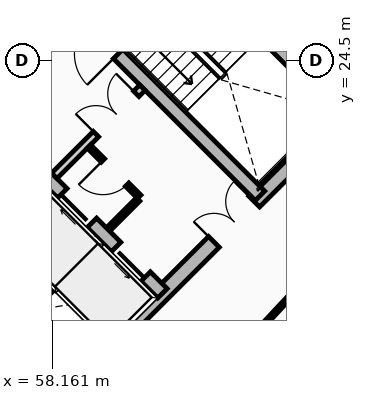
"""IFC4 building model, lengths in metres.
Left out: names, types, materials, properties, quantities, classifications, styles, units other than length and angle.
Written with IfcOpenShell. Run it as: python <this file> out.ifc"""

import sys

from ifc_helpers import new_model, si_unit, direction, frame, frame_2d, origin, place, context, subcontext, project, spatial, rectangle, extrude, source, transform, mapped, element, fill, save


model = new_model("IFC4")
c1 = context("Model", 3, precision=1e-05, world=origin(), true_north=direction((0.0, 1.0)))
c2 = subcontext(c1, "Body", "Model", "MODEL_VIEW")
j1 = project(units=[si_unit("LENGTHUNIT", "METRE"), si_unit("PLANEANGLEUNIT", "RADIAN")], contexts=[c1])
p1 = place(None, origin())
s1 = spatial("IfcSite", under=j1, at=p1, CompositionType="ELEMENT")
p2 = place(p1, origin())
s2 = spatial("IfcBuilding", under=s1, at=p2, CompositionType="ELEMENT")
p3 = place(p2, frame((0.0, 0.0, 189.43)))
s3 = spatial("IfcBuildingStorey", under=s2, at=p3, CompositionType="ELEMENT", Elevation=189.43)
for number, where, z_axis, x_axis in (
    (1, (58.702, 15.732, 0.0), (0.0, 0.0, 1.0), (-0.707, 0.707, 0.0)),
    (2, (66.268, 23.298, 0.0), (0.0, 0.0, 1.0), (-0.707, 0.707, 0.0)),
):
    element("IfcWall", number, at=place(p3, frame(where, z_axis=z_axis, x_axis=x_axis)), inside=s3, PredefinedType="SHEAR", context=c2, shape_type="SweptSolid", body=[
        extrude(rectangle(XDim=14.1, YDim=0.4, at=frame_2d((7.05, 0.0))), origin(), (0.0, 0.0, 1.0), 2.91),
    ])
p4 = place(p3, frame((58.561, 15.873, 0.0), z_axis=(0.0, 0.0, 1.0), x_axis=(0.707106781187, 0.707106781187, 0.0)))
e3 = element("IfcWall", 3, at=p4, inside=s3, PredefinedType="SHEAR", context=c2, shape_type="SweptSolid", body=[
    extrude(rectangle(XDim=10.7, YDim=0.4, at=frame_2d((5.35, 0.0))), origin(), (0.0, 0.0, 1.0), 2.91),
])
m1 = source(origin(), c2, "Body", "SweptSolid", [
    extrude(rectangle(XDim=1.5, YDim=2.02, at=frame_2d((0.75, 1.01))), frame((0.0, 0.21, 0.0), z_axis=(0.0, -1.0, 0.0), x_axis=(1.0, 0.0, 0.0)), (0.0, 0.0, 1.0), 0.42),
])
p5 = place(p4, frame((5.45, 0.0, 0.0)))
e4 = element("IfcOpeningElement", 4, at=p5, cuts=e3, PredefinedType="OPENING", context=c2, shape_type="MappedRepresentation", body=[
    mapped(m1, transform((0.0, 0.0, 0.0), x_axis=(1.0, 0.0, 0.0), y_axis=(0.0, 1.0, 0.0), z_axis=(0.0, 0.0, 1.0), scale=1.0)),
])
p6 = place(p3, frame((61.06, 18.373, 0.0), z_axis=(0.0, 0.0, 1.0), x_axis=(-0.707106781187, 0.707106781187, 0.0)))
e5 = element("IfcWall", 5, at=p6, inside=s3, PredefinedType="SHEAR", context=c2, shape_type="SweptSolid", body=[
    extrude(rectangle(XDim=13.7, YDim=0.35, at=frame_2d((6.85, 0.0))), origin(), (0.0, 0.0, 1.0), 2.91),
])
m2 = source(origin(), c2, "Body", "SweptSolid", [
    extrude(rectangle(XDim=1.1, YDim=2.015, at=frame_2d((0.55, 1.007))), frame((0.0, 0.185, 0.0), z_axis=(0.0, -1.0, 0.0), x_axis=(1.0, 0.0, 0.0)), (0.0, 0.0, 1.0), 0.37),
])
p7 = place(p6, frame((4.85, 0.0, 0.0)))
e6 = element("IfcOpeningElement", 6, at=p7, cuts=e5, PredefinedType="OPENING", context=c2, shape_type="MappedRepresentation", body=[
    mapped(m2, transform((0.0, 0.0, 0.0), x_axis=(1.0, 0.0, 0.0), y_axis=(0.0, 1.0, 0.0), z_axis=(0.0, 0.0, 1.0), scale=1.0)),
])
p8 = place(p6, frame((0.625, 0.0, 0.0)))
e7 = element("IfcOpeningElement", 7, at=p8, cuts=e5, PredefinedType="OPENING", context=c2, shape_type="MappedRepresentation", body=[
    mapped(m2, transform((0.0, 0.0, 0.0), x_axis=(1.0, 0.0, 0.0), y_axis=(0.0, 1.0, 0.0), z_axis=(0.0, 0.0, 1.0), scale=1.0)),
])
p9 = place(p6, frame((2.625, 0.0, 0.0)))
e8 = element("IfcOpeningElement", 8, at=p9, cuts=e5, PredefinedType="OPENING", context=c2, shape_type="MappedRepresentation", body=[
    mapped(m2, transform((0.0, 0.0, 0.0), x_axis=(1.0, 0.0, 0.0), y_axis=(0.0, 1.0, 0.0), z_axis=(0.0, 0.0, 1.0), scale=1.0)),
])
m3 = source(origin(), c2, "Body", "SweptSolid", [
    extrude(rectangle(XDim=1.15, YDim=2.02, at=frame_2d((0.575, 1.01))), frame((0.0, 0.185, 0.0), z_axis=(0.0, -1.0, 0.0), x_axis=(1.0, 0.0, 0.0)), (0.0, 0.0, 1.0), 0.37),
])
p10 = place(p6, frame((7.27, 0.0, 0.0)))
e9 = element("IfcOpeningElement", 9, at=p10, cuts=e5, PredefinedType="OPENING", context=c2, shape_type="MappedRepresentation", body=[
    mapped(m3, transform((0.0, 0.0, 0.0), x_axis=(1.0, 0.0, 0.0), y_axis=(0.0, 1.0, 0.0), z_axis=(0.0, 0.0, 1.0), scale=1.0)),
])
p11 = place(p3, frame((63.627, 20.94, 0.0), z_axis=(0.0, 0.0, 1.0), x_axis=(-0.707119496762, 0.707094065383, 0.0)))
e10 = element("IfcWall", 10, at=p11, inside=s3, PredefinedType="SHEAR", context=c2, shape_type="SweptSolid", body=[
    extrude(rectangle(XDim=9.6, YDim=0.35, at=frame_2d((4.8, 0.0))), origin(), (0.0, 0.0, 1.0), 2.91),
])
p12 = place(p11, frame((5.28, 0.0, 0.0)))
e11 = element("IfcOpeningElement", 11, at=p12, cuts=e10, PredefinedType="OPENING", context=c2, shape_type="MappedRepresentation", body=[
    mapped(m3, transform((0.0, 0.0, 0.0), x_axis=(1.0, 0.0, 0.0), y_axis=(0.0, 1.0, 0.0), z_axis=(0.0, 0.0, 1.0), scale=1.0)),
])
p13 = place(p3, frame((65.812, 23.125, 0.0), z_axis=(0.0, 0.0, 1.0), x_axis=(-0.707106781187, 0.707106781187, 0.0)))
e12 = element("IfcWall", 12, at=p13, inside=s3, PredefinedType="SHEAR", context=c2, shape_type="SweptSolid", body=[
    extrude(rectangle(XDim=6.695, YDim=0.35, at=frame_2d((3.348, 0.0))), origin(), (0.0, 0.0, 1.0), 2.91),
])
p14 = place(p3, frame((57.284, 17.673, 0.0), z_axis=(0.0, 0.0, 1.0), x_axis=(0.707147878904, 0.70706568108, 0.0)))
e13 = element("IfcWall", 13, at=p14, inside=s3, PredefinedType="SHEAR", context=c2, shape_type="SweptSolid", body=[
    extrude(rectangle(XDim=2.97, YDim=0.2, at=frame_2d((1.485, 0.0))), origin(), (0.0, 0.0, 1.0), 2.91),
])
p15 = place(p3, frame((58.737, 16.644, 0.0), z_axis=(0.0, 0.0, 1.0), x_axis=(-0.707032117043, 0.707181437447, 0.0)))
e14 = element("IfcWall", 14, at=p15, inside=s3, PredefinedType="SHEAR", context=c2, shape_type="SweptSolid", body=[
    extrude(rectangle(XDim=1.635, YDim=0.2, at=frame_2d((0.817, 0.0))), origin(), (0.0, 0.0, 1.0), 2.91),
])
p16 = place(p3, frame((58.214, 21.467, 0.0), z_axis=(0.0, 0.0, 1.0), x_axis=(0.707106781187, 0.707106781187, 0.0)))
e15 = element("IfcWall", 15, at=p16, inside=s3, PredefinedType="PARTITIONING", context=c2, shape_type="SweptSolid", body=[
    extrude(rectangle(XDim=3.28, YDim=0.2, at=frame_2d((1.64, 0.0))), origin(), (0.0, 0.0, 1.0), 2.555),
])
m4 = source(origin(), c2, "Body", "SweptSolid", [
    extrude(rectangle(XDim=1.5, YDim=2.02, at=frame_2d((0.75, 1.01))), frame((0.0, 0.11, 0.0), z_axis=(0.0, -1.0, 0.0), x_axis=(1.0, 0.0, 0.0)), (0.0, 0.0, 1.0), 0.22),
])
p17 = place(p16, frame((1.55, 0.0, 0.0)))
e16 = element("IfcOpeningElement", 16, at=p17, cuts=e15, PredefinedType="OPENING", context=c2, shape_type="MappedRepresentation", body=[
    mapped(m4, transform((0.0, 0.0, 0.0), x_axis=(1.0, 0.0, 0.0), y_axis=(0.0, 1.0, 0.0), z_axis=(0.0, 0.0, 1.0), scale=1.0)),
])
p18 = place(p3, frame((60.448, 20.915, 0.0), z_axis=(0.0, 0.0, 1.0), x_axis=(-0.707106781187, 0.707106781187, 0.0)))
e17 = element("IfcWall", 17, at=p18, inside=s3, PredefinedType="PARTITIONING", context=c2, shape_type="SweptSolid", body=[
    extrude(rectangle(XDim=1.87, YDim=0.125, at=frame_2d((0.935, 0.0))), origin(), (0.0, 0.0, 1.0), 2.555),
])
m5 = source(origin(), c2, "Body", "SweptSolid", [
    extrude(rectangle(XDim=0.9, YDim=2.005, at=frame_2d((0.45, 1.002))), frame((0.0, 0.073, 0.0), z_axis=(0.0, -1.0, 0.0), x_axis=(1.0, 0.0, 0.0)), (0.0, 0.0, 1.0), 0.145),
])
p19 = place(p18, frame((0.45, 0.0, 0.0)))
e18 = element("IfcOpeningElement", 18, at=p19, cuts=e17, PredefinedType="OPENING", context=c2, shape_type="MappedRepresentation", body=[
    mapped(m5, transform((0.0, 0.0, 0.0), x_axis=(1.0, 0.0, 0.0), y_axis=(0.0, 1.0, 0.0), z_axis=(0.0, 0.0, 1.0), scale=1.0)),
])
p20 = place(p3, frame((59.643, 20.066, 0.0), z_axis=(0.0, 0.0, 1.0), x_axis=(0.707106781187, 0.707106781187, 0.0)))
e19 = element("IfcWall", 19, at=p20, inside=s3, PredefinedType="PARTITIONING", context=c2, shape_type="SweptSolid", body=[
    extrude(rectangle(XDim=1.1, YDim=0.125, at=frame_2d((0.55, 0.0))), origin(), (0.0, 0.0, 1.0), 2.555),
])
p21 = place(p3, frame((62.903, 16.667, 0.0), z_axis=(0.0, 0.0, 1.0), x_axis=(0.682371947497, 0.731005147225, 0.0)))
e20 = element("IfcWall", 20, at=p21, inside=s3, PredefinedType="MOVABLE", context=c2, shape_type="SweptSolid", body=[
    extrude(rectangle(XDim=6.642, YDim=0.1, at=frame_2d((3.321, 0.0))), origin(), (0.0, 0.0, 1.0), 2.125),
])
m6 = source(origin(), c2, "Body", "SweptSolid", [
    extrude(rectangle(XDim=1.1, YDim=2.015, at=frame_2d((0.55, 1.007))), frame((0.0, 0.025, 0.0), z_axis=(0.0, -1.0, 0.0), x_axis=(1.0, 0.0, 0.0)), (0.0, 0.0, 1.0), 0.05),
])
p22 = place(p8, origin())
e21 = element("IfcDoor", 21, at=p22, inside=s3, OperationType="SLIDING_TO_LEFT", PredefinedType="DOOR", context=c2, shape_type="MappedRepresentation", body=[
    mapped(m6, transform((0.0, 0.0, 0.0), x_axis=(1.0, 0.0, 0.0), y_axis=(0.0, 1.0, 0.0), z_axis=(0.0, 0.0, 1.0), scale=1.0)),
])
fill(e7, e21)
p23 = place(p9, origin())
e22 = element("IfcDoor", 22, at=p23, inside=s3, OperationType="SLIDING_TO_RIGHT", PredefinedType="DOOR", context=c2, shape_type="MappedRepresentation", body=[
    mapped(m6, transform((0.0, 0.0, 0.0), x_axis=(1.0, 0.0, 0.0), y_axis=(0.0, 1.0, 0.0), z_axis=(0.0, 0.0, 1.0), scale=1.0)),
])
fill(e8, e22)
m7 = source(origin(), c2, "Body", "SweptSolid", [
    extrude(rectangle(XDim=1.15, YDim=2.02, at=frame_2d((0.575, 1.01))), frame((0.0, 0.025, 0.0), z_axis=(0.0, -1.0, 0.0), x_axis=(1.0, 0.0, 0.0)), (0.0, 0.0, 1.0), 0.05),
])
p24 = place(p12, origin())
e23 = element("IfcDoor", 23, at=p24, inside=s3, OperationType="SINGLE_SWING_LEFT", PredefinedType="DOOR", context=c2, shape_type="MappedRepresentation", body=[
    mapped(m7, transform((0.0, 0.0, 0.0), x_axis=(1.0, 0.0, 0.0), y_axis=(0.0, 1.0, 0.0), z_axis=(0.0, 0.0, 1.0), scale=1.0)),
])
fill(e11, e23)
m8 = source(origin(), c2, "Body", "SweptSolid", [
    extrude(rectangle(XDim=1.5, YDim=2.02, at=frame_2d((0.75, 1.01))), frame((0.0, 0.025, 0.0), z_axis=(0.0, -1.0, 0.0), x_axis=(1.0, 0.0, 0.0)), (0.0, 0.0, 1.0), 0.05),
])
p25 = place(p5, origin())
e24 = element("IfcDoor", 24, at=p25, inside=s3, OperationType="DOUBLE_DOOR_SINGLE_SWING", PredefinedType="DOOR", context=c2, shape_type="MappedRepresentation", body=[
    mapped(m8, transform((0.0, 0.0, 0.0), x_axis=(1.0, 0.0, 0.0), y_axis=(0.0, 1.0, 0.0), z_axis=(0.0, 0.0, 1.0), scale=1.0)),
])
fill(e4, e24)
p26 = place(p17, origin())
e25 = element("IfcDoor", 25, at=p26, inside=s3, OperationType="DOUBLE_DOOR_SINGLE_SWING", PredefinedType="DOOR", context=c2, shape_type="MappedRepresentation", body=[
    mapped(m8, transform((0.0, 0.0, 0.0), x_axis=(1.0, 0.0, 0.0), y_axis=(0.0, 1.0, 0.0), z_axis=(0.0, 0.0, 1.0), scale=1.0)),
])
fill(e16, e25)
m9 = source(origin(), c2, "Body", "SweptSolid", [
    extrude(rectangle(XDim=0.9, YDim=2.005, at=frame_2d((0.45, 1.002))), frame((0.0, 0.025, 0.0), z_axis=(0.0, -1.0, 0.0), x_axis=(1.0, 0.0, 0.0)), (0.0, 0.0, 1.0), 0.05),
])
p27 = place(p19, origin())
e26 = element("IfcDoor", 26, at=p27, inside=s3, OperationType="SINGLE_SWING_RIGHT", PredefinedType="DOOR", context=c2, shape_type="MappedRepresentation", body=[
    mapped(m9, transform((0.0, 0.0, 0.0), x_axis=(1.0, 0.0, 0.0), y_axis=(0.0, 1.0, 0.0), z_axis=(0.0, 0.0, 1.0), scale=1.0)),
])
fill(e18, e26)
save(model, sys.argv[1])
